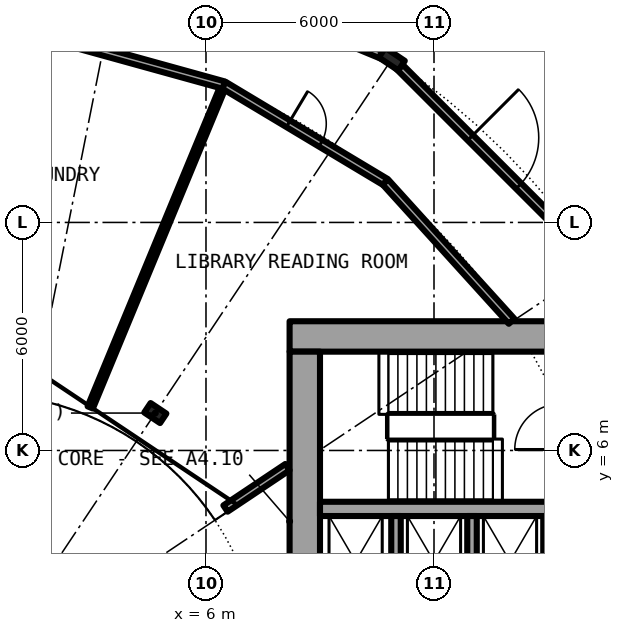
"""IFC4 building model, lengths in metres.
Left out: names, types, materials, properties, quantities, classifications, styles, units other than length and angle.
Written with IfcOpenShell. Run it as: python <this file> out.ifc"""

import sys

from ifc_helpers import new_model, si_unit, direction, frame, frame_2d, origin, origin_2d, place, context, subcontext, project, spatial, rectangle, i_section, extrude, element, fill, save


model = new_model("IFC4")
c1 = context("Model", 3, precision=1e-05, world=origin(), true_north=direction((0.0, 1.0)))
c2 = subcontext(c1, "Body", "Model", "MODEL_VIEW")
j1 = project(units=[si_unit("LENGTHUNIT", "METRE"), si_unit("PLANEANGLEUNIT", "RADIAN")], contexts=[c1])
p1 = place(None, origin())
s1 = spatial("IfcSite", under=j1, at=p1, CompositionType="ELEMENT")
p2 = place(p1, origin())
s2 = spatial("IfcBuilding", under=s1, at=p2, CompositionType="ELEMENT")
p3 = place(p2, frame((0.0, 0.0, 53.3)))
s3 = spatial("IfcBuildingStorey", under=s2, at=p3, CompositionType="ELEMENT", Elevation=53.3)
p4 = place(p3, frame((10.889, 16.297, 0.0), z_axis=(0.0, 0.0, 1.0), x_axis=(0.55557023302, 0.831469612303, 0.0)))
e1 = element("IfcColumn", 1, at=p4, inside=s3, PredefinedType="COLUMN", context=c2, shape_type="SweptSolid", body=[
    extrude(i_section(OverallWidth=0.305, OverallDepth=0.62, WebThickness=0.021, FlangeThickness=0.04, FilletRadius=0.027, at=origin_2d()), origin(), (0.0, 0.0, 1.0), 4.2),
])
p5 = place(p3, frame((4.667, 6.984, 0.0), z_axis=(0.0, 0.0, 1.0), x_axis=(0.55557023302, 0.831469612303, 0.0)))
e2 = element("IfcColumn", 2, at=p5, inside=s3, PredefinedType="COLUMN", context=c2, shape_type="SweptSolid", body=[
    extrude(i_section(OverallWidth=0.3, OverallDepth=0.5, WebThickness=0.014, FlangeThickness=0.028, FilletRadius=0.027, at=origin_2d()), origin(), (0.0, 0.0, 1.0), 4.2),
])
p6 = place(p3, frame((22.4, 9.0, 0.0), z_axis=(0.0, 0.0, 1.0), x_axis=(-1.0, 0.0, 0.0)))
e3 = element("IfcWall", 3, at=p6, inside=s3, PredefinedType="SHEAR", context=c2, shape_type="SweptSolid", body=[
    extrude(rectangle(XDim=14.2, YDim=0.8, at=frame_2d((7.1, 0.0))), origin(), (0.0, 0.0, 1.0), 4.2),
])
p7 = place(p6, frame((1.325, 0.0, 0.0)))
e4 = element("IfcOpeningElement", 4, at=p7, cuts=e3, PredefinedType="OPENING", context=c2, shape_type="SweptSolid", body=[
    extrude(rectangle(XDim=1.2, YDim=2.3, at=frame_2d((0.6, 1.15))), frame((0.0, 0.41, 0.0), z_axis=(0.0, -1.0, 0.0), x_axis=(1.0, 0.0, 0.0)), (0.0, 0.0, 1.0), 0.82),
])
p8 = place(p3, frame((8.6, -8.6, 0.0), z_axis=(0.0, 0.0, 1.0), x_axis=(0.0, 1.0, 0.0)))
e5 = element("IfcWall", 5, at=p8, inside=s3, PredefinedType="SHEAR", context=c2, shape_type="SweptSolid", body=[
    extrude(rectangle(XDim=17.2, YDim=0.8, at=frame_2d((8.6, 0.0))), origin(), (0.0, 0.0, 1.0), 4.2),
])
p9 = place(p8, frame((7.4, 0.0, 0.1)))
e6 = element("IfcOpeningElement", 6, at=p9, cuts=e5, PredefinedType="OPENING", context=c2, shape_type="SweptSolid", body=[
    extrude(rectangle(XDim=2.4, YDim=2.2, at=frame_2d((1.2, 1.1))), frame((0.0, 0.41, 0.0), z_axis=(0.0, -1.0, 0.0), x_axis=(1.0, 0.0, 0.0)), (0.0, 0.0, 1.0), 0.82),
])
p10 = place(p3, frame((9.0, 4.462, 0.0), z_axis=(0.0, 0.0, 1.0), x_axis=(1.0, 0.0, 0.0)))
e7 = element("IfcWall", 7, at=p10, inside=s3, PredefinedType="SHEAR", context=c2, shape_type="SweptSolid", body=[
    extrude(rectangle(XDim=10.15, YDim=0.375, at=frame_2d((5.075, 0.0))), origin(), (0.0, 0.0, 1.0), 4.2),
])
p11 = place(p10, frame((6.6, 0.0, 0.0)))
e8 = element("IfcOpeningElement", 8, at=p11, cuts=e7, PredefinedType="OPENING", context=c2, shape_type="SweptSolid", body=[
    extrude(rectangle(XDim=1.1, YDim=2.3, at=frame_2d((0.55, 1.15))), frame((0.0, 0.198, 0.0), z_axis=(0.0, -1.0, 0.0), x_axis=(1.0, 0.0, 0.0)), (0.0, 0.0, 1.0), 0.395),
])
for number, where, z_axis, x_axis in (
    (9, (15.0, 1.825, 0.0), (0.0, 0.0, 1.0), (0.0, 1.0, 0.0)),
    (10, (11.0, 1.825, 0.0), (0.0, 0.0, 1.0), (0.0, 1.0, 0.0)),
    (11, (13.0, 1.825, 0.0), (0.0, 0.0, 1.0), (0.0, 1.0, 0.0)),
):
    element("IfcWall", number, at=place(p3, frame(where, z_axis=z_axis, x_axis=x_axis)), inside=s3, PredefinedType="SOLIDWALL", context=c2, shape_type="SweptSolid", body=[
        extrude(rectangle(XDim=2.45, YDim=0.25, at=frame_2d((1.225, 0.0))), origin(), (0.0, 0.0, 1.0), 3.8),
    ])
p12 = place(p3, frame((2.954, 7.132, 0.0), z_axis=(0.0, 0.0, 1.0), x_axis=(0.382646942224, 0.923894646378, 0.0)))
e12 = element("IfcWall", 12, at=p12, inside=s3, PredefinedType="PARTITIONING", context=c2, shape_type="SweptSolid", body=[
    extrude(rectangle(XDim=9.181, YDim=0.15, at=frame_2d((4.59, 0.0))), origin(), (0.0, 0.0, 1.0), 3.8),
])
p13 = place(p3, frame((6.513, 4.472, 0.0), z_axis=(0.0, 0.0, 1.0), x_axis=(0.831417956244, 0.555647533996, 0.0)))
e13 = element("IfcWall", 13, at=p13, inside=s3, PredefinedType="PARTITIONING", context=c2, shape_type="SweptSolid", body=[
    extrude(rectangle(XDim=1.962, YDim=0.2, at=frame_2d((0.981, 0.0))), origin(), (0.0, 0.0, 1.0), 3.8),
])
p14 = place(p3, frame((6.467, 15.614, 0.0), z_axis=(0.0, 0.0, 1.0), x_axis=(0.857696997328, -0.514155483074, 0.0)))
e14 = element("IfcWall", 14, at=p14, inside=s3, PredefinedType="PARTITIONING", context=c2, shape_type="SweptSolid", body=[
    extrude(rectangle(XDim=4.96, YDim=0.2, at=frame_2d((2.48, 0.0))), origin(), (0.0, 0.0, 1.0), 3.8),
])
p15 = place(p14, frame((1.98, 0.0, 0.0)))
e15 = element("IfcOpeningElement", 15, at=p15, cuts=e14, PredefinedType="OPENING", context=c2, shape_type="SweptSolid", body=[
    extrude(rectangle(XDim=1.0, YDim=2.3, at=frame_2d((0.5, 1.15))), frame((0.0, 0.11, 0.0), z_axis=(0.0, -1.0, 0.0), x_axis=(1.0, 0.0, 0.0)), (0.0, 0.0, 1.0), 0.22),
])
p16 = place(p3, frame((10.721, 13.064, 0.0), z_axis=(0.0, 0.0, 1.0), x_axis=(0.671573636767, -0.740937818173, 0.0)))
e16 = element("IfcWall", 16, at=p16, inside=s3, PredefinedType="PARTITIONING", context=c2, shape_type="SweptSolid", body=[
    extrude(rectangle(XDim=4.945, YDim=0.2, at=frame_2d((2.473, 0.0))), origin(), (0.0, 0.0, 1.0), 3.8),
])
p17 = place(p3, frame((2.48, 16.717, 0.0), z_axis=(0.0, 0.0, 1.0), x_axis=(0.96379724587, -0.266636210694, 0.0)))
e17 = element("IfcWall", 17, at=p17, inside=s3, PredefinedType="PARTITIONING", context=c2, shape_type="SweptSolid", body=[
    extrude(rectangle(XDim=4.137, YDim=0.2, at=frame_2d((2.068, 0.0))), origin(), (0.0, 0.0, 1.0), 3.8),
])
p18 = place(p3, frame((3.967, 19.164, 0.0), z_axis=(0.0, 0.0, 1.0), x_axis=(0.923873274019, -0.382698541353, 0.0)))
e18 = element("IfcWall", 18, at=p18, inside=s3, PredefinedType="PARTITIONING", context=c2, shape_type="SweptSolid", body=[
    extrude(rectangle(XDim=7.338, YDim=0.2, at=frame_2d((3.669, 0.0))), origin(), (0.0, 0.0, 1.0), 3.48),
])
p19 = place(p3, frame((10.999, 16.187, 0.0), z_axis=(0.0, 0.0, 1.0), x_axis=(0.707106781187, -0.707106781187, 0.0)))
e19 = element("IfcWall", 19, at=p19, inside=s3, PredefinedType="PARTITIONING", context=c2, shape_type="SweptSolid", body=[
    extrude(rectangle(XDim=7.337, YDim=0.2, at=frame_2d((3.668, 0.0))), origin(), (0.0, 0.0, 1.0), 3.48),
])
p20 = place(p19, frame((2.768, 0.0, 0.0)))
e20 = element("IfcOpeningElement", 20, at=p20, cuts=e19, PredefinedType="OPENING", context=c2, shape_type="SweptSolid", body=[
    extrude(rectangle(XDim=1.8, YDim=2.3, at=frame_2d((0.9, 1.15))), frame((0.0, 0.11, 0.0), z_axis=(0.0, -1.0, 0.0), x_axis=(1.0, 0.0, 0.0)), (0.0, 0.0, 1.0), 0.22),
])
p21 = place(p20, origin())
e21 = element("IfcDoor", 21, at=p21, inside=s3, OperationType="DOUBLE_DOOR_SINGLE_SWING", PredefinedType="DOOR", context=c2, shape_type="SweptSolid", body=[
    extrude(rectangle(XDim=1.8, YDim=2.3, at=frame_2d((0.9, 1.15))), frame((0.0, 0.025, 0.0), z_axis=(0.0, -1.0, 0.0), x_axis=(1.0, 0.0, 0.0)), (0.0, 0.0, 1.0), 0.05),
])
fill(e20, e21)
p22 = place(p15, origin())
e22 = element("IfcDoor", 22, at=p22, inside=s3, OperationType="SINGLE_SWING_LEFT", PredefinedType="DOOR", context=c2, shape_type="SweptSolid", body=[
    extrude(rectangle(XDim=1.0, YDim=2.3, at=frame_2d((0.5, 1.15))), frame((0.0, 0.025, 0.0), z_axis=(0.0, -1.0, 0.0), x_axis=(1.0, 0.0, 0.0)), (0.0, 0.0, 1.0), 0.05),
])
fill(e15, e22)
save(model, sys.argv[1])
